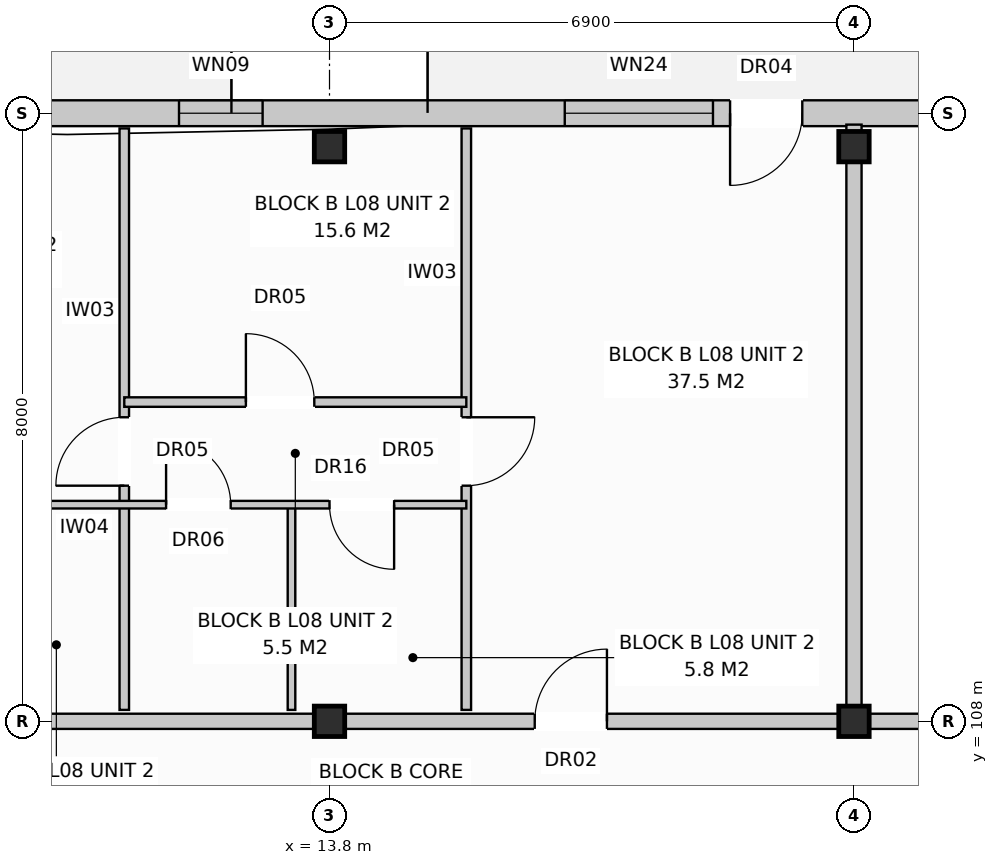
"""IFC4 building model, lengths in metres.
Left out: names, types, materials, properties, quantities, classifications, styles, units other than length and angle.
Written with IfcOpenShell. Run it as: python <this file> out.ifc"""

import sys

from ifc_helpers import new_model, si_unit, direction, frame, frame_2d, origin, origin_with_axes, origin_2d, place, context, subcontext, project, spatial, rectangle, extrude, element, fill, save


model = new_model("IFC4")
c1 = context("Model", 3, precision=1e-05, world=origin(), true_north=direction((0.0, 1.0)))
c2 = subcontext(c1, "Body", "Model", "MODEL_VIEW")
j1 = project(units=[si_unit("LENGTHUNIT", "METRE"), si_unit("PLANEANGLEUNIT", "RADIAN")], contexts=[c1])
p1 = place(None, origin())
s1 = spatial("IfcSite", under=j1, at=p1, CompositionType="ELEMENT")
p2 = place(p1, origin())
s2 = spatial("IfcBuilding", under=s1, at=p2, CompositionType="ELEMENT")
p3 = place(p2, frame((0.0, 0.0, 27.2)))
s3 = spatial("IfcBuildingStorey", under=s2, at=p3, CompositionType="ELEMENT", Elevation=27.2)
for number, where, z_axis, x_axis in (
    (1, (13.8, 108.0, 0.0), (0.0, 0.0, 1.0), (1.0, 0.0, 0.0)),
    (2, (13.8, 115.56, 0.0), (0.0, 0.0, 1.0), (1.0, 0.0, 0.0)),
    (3, (20.7, 108.0, 0.0), (0.0, 0.0, 1.0), (1.0, 0.0, 0.0)),
    (4, (20.7, 115.56, 0.0), (0.0, 0.0, 1.0), (1.0, 0.0, 0.0)),
):
    element("IfcColumn", number, at=place(p3, frame(where, z_axis=z_axis, x_axis=x_axis)), inside=s3, PredefinedType="COLUMN", context=c2, shape_type="SweptSolid", body=[
        extrude(rectangle(XDim=0.4, YDim=0.4, at=origin_2d()), origin(), (0.0, 0.0, 1.0), 3.2),
    ])
p4 = place(p3, frame((0.16, 116.0, 0.0), z_axis=(0.0, 0.0, 1.0), x_axis=(1.0, 0.0, 0.0)))
e5 = element("IfcWall", 5, at=p4, inside=s3, PredefinedType="STANDARD", context=c2, shape_type="SweptSolid", body=[
    extrude(rectangle(XDim=41.08, YDim=0.34, at=frame_2d((20.54, 0.0))), origin(), (0.0, 0.0, 1.0), 2.96),
])
p5 = place(p4, frame((2.5, 0.0, 0.0)))
e6 = element("IfcOpeningElement", 6, at=p5, cuts=e5, PredefinedType="OPENING", context=c2, shape_type="SweptSolid", body=[
    extrude(rectangle(XDim=0.95, YDim=2.1, at=frame_2d((0.475, 1.05))), frame((0.0, 0.182, 0.0), z_axis=(0.0, -1.0, 0.0), x_axis=(1.0, 0.0, 0.0)), (0.0, 0.0, 1.0), 0.364),
])
p6 = place(p4, frame((18.91, 0.0, 0.0)))
e7 = element("IfcOpeningElement", 7, at=p6, cuts=e5, PredefinedType="OPENING", context=c2, shape_type="SweptSolid", body=[
    extrude(rectangle(XDim=0.95, YDim=2.1, at=frame_2d((0.475, 1.05))), frame((0.0, 0.182, 0.0), z_axis=(0.0, -1.0, 0.0), x_axis=(1.0, 0.0, 0.0)), (0.0, 0.0, 1.0), 0.364),
])
p7 = place(p4, frame((32.71, 0.0, 0.0)))
e8 = element("IfcOpeningElement", 8, at=p7, cuts=e5, PredefinedType="OPENING", context=c2, shape_type="SweptSolid", body=[
    extrude(rectangle(XDim=0.95, YDim=2.1, at=frame_2d((0.475, 1.05))), frame((0.0, 0.182, 0.0), z_axis=(0.0, -1.0, 0.0), x_axis=(1.0, 0.0, 0.0)), (0.0, 0.0, 1.0), 0.364),
])
p8 = place(p4, frame((0.81, 0.0, 0.72)))
e9 = element("IfcOpeningElement", 9, at=p8, cuts=e5, PredefinedType="OPENING", context=c2, shape_type="SweptSolid", body=[
    extrude(rectangle(XDim=1.1, YDim=1.5, at=frame_2d((0.55, 0.75))), frame((0.0, 0.182, 0.0), z_axis=(0.0, -1.0, 0.0), x_axis=(1.0, 0.0, 0.0)), (0.0, 0.0, 1.0), 0.364),
])
p9 = place(p4, frame((4.235, 0.0, 0.8)))
e10 = element("IfcOpeningElement", 10, at=p9, cuts=e5, PredefinedType="OPENING", context=c2, shape_type="SweptSolid", body=[
    extrude(rectangle(XDim=1.95, YDim=1.65, at=frame_2d((0.975, 0.825))), frame((0.0, 0.182, 0.0), z_axis=(0.0, -1.0, 0.0), x_axis=(1.0, 0.0, 0.0)), (0.0, 0.0, 1.0), 0.364),
])
p10 = place(p4, frame((8.01, 0.0, 0.8)))
e11 = element("IfcOpeningElement", 11, at=p10, cuts=e5, PredefinedType="OPENING", context=c2, shape_type="SweptSolid", body=[
    extrude(rectangle(XDim=1.8, YDim=1.7, at=frame_2d((0.9, 0.85))), frame((0.0, 0.182, 0.0), z_axis=(0.0, -1.0, 0.0), x_axis=(1.0, 0.0, 0.0)), (0.0, 0.0, 1.0), 0.364),
])
p11 = place(p4, frame((11.66, 0.0, 0.72)))
e12 = element("IfcOpeningElement", 12, at=p11, cuts=e5, PredefinedType="OPENING", context=c2, shape_type="SweptSolid", body=[
    extrude(rectangle(XDim=1.1, YDim=1.5, at=frame_2d((0.55, 0.75))), frame((0.0, 0.182, 0.0), z_axis=(0.0, -1.0, 0.0), x_axis=(1.0, 0.0, 0.0)), (0.0, 0.0, 1.0), 0.364),
])
p12 = place(p4, frame((16.735, 0.0, 0.8)))
e13 = element("IfcOpeningElement", 13, at=p12, cuts=e5, PredefinedType="OPENING", context=c2, shape_type="SweptSolid", body=[
    extrude(rectangle(XDim=1.95, YDim=1.65, at=frame_2d((0.975, 0.825))), frame((0.0, 0.182, 0.0), z_axis=(0.0, -1.0, 0.0), x_axis=(1.0, 0.0, 0.0)), (0.0, 0.0, 1.0), 0.364),
])
p13 = place(p4, frame((22.31, 0.0, 0.8)))
e14 = element("IfcOpeningElement", 14, at=p13, cuts=e5, PredefinedType="OPENING", context=c2, shape_type="SweptSolid", body=[
    extrude(rectangle(XDim=1.8, YDim=1.7, at=frame_2d((0.9, 0.85))), frame((0.0, 0.182, 0.0), z_axis=(0.0, -1.0, 0.0), x_axis=(1.0, 0.0, 0.0)), (0.0, 0.0, 1.0), 0.364),
])
p14 = place(p4, frame((28.36, 0.0, 0.72)))
e15 = element("IfcOpeningElement", 15, at=p14, cuts=e5, PredefinedType="OPENING", context=c2, shape_type="SweptSolid", body=[
    extrude(rectangle(XDim=1.1, YDim=1.5, at=frame_2d((0.55, 0.75))), frame((0.0, 0.182, 0.0), z_axis=(0.0, -1.0, 0.0), x_axis=(1.0, 0.0, 0.0)), (0.0, 0.0, 1.0), 0.364),
])
p15 = place(p4, frame((30.435, 0.0, 0.8)))
e16 = element("IfcOpeningElement", 16, at=p15, cuts=e5, PredefinedType="OPENING", context=c2, shape_type="SweptSolid", body=[
    extrude(rectangle(XDim=1.95, YDim=1.65, at=frame_2d((0.975, 0.825))), frame((0.0, 0.182, 0.0), z_axis=(0.0, -1.0, 0.0), x_axis=(1.0, 0.0, 0.0)), (0.0, 0.0, 1.0), 0.364),
])
p16 = place(p4, frame((35.61, 0.0, 0.8)))
e17 = element("IfcOpeningElement", 17, at=p16, cuts=e5, PredefinedType="OPENING", context=c2, shape_type="SweptSolid", body=[
    extrude(rectangle(XDim=1.8, YDim=1.7, at=frame_2d((0.9, 0.85))), frame((0.0, 0.182, 0.0), z_axis=(0.0, -1.0, 0.0), x_axis=(1.0, 0.0, 0.0)), (0.0, 0.0, 1.0), 0.364),
])
p17 = place(p4, frame((39.26, 0.0, 0.72)))
e18 = element("IfcOpeningElement", 18, at=p17, cuts=e5, PredefinedType="OPENING", context=c2, shape_type="SweptSolid", body=[
    extrude(rectangle(XDim=1.1, YDim=1.5, at=frame_2d((0.55, 0.75))), frame((0.0, 0.182, 0.0), z_axis=(0.0, -1.0, 0.0), x_axis=(1.0, 0.0, 0.0)), (0.0, 0.0, 1.0), 0.364),
])
p18 = place(p3, frame((20.7, 108.15, 0.0), z_axis=(0.0, 0.0, 1.0), x_axis=(0.0, 1.0, 0.0)))
e19 = element("IfcWall", 19, at=p18, inside=s3, PredefinedType="PARTITIONING", context=c2, shape_type="SweptSolid", body=[
    extrude(rectangle(XDim=7.7, YDim=0.2, at=frame_2d((3.85, 0.0))), origin(), (0.0, 0.0, 1.0), 2.96),
])
p19 = place(p3, frame((6.9, 108.0, 0.0), z_axis=(0.0, 0.0, 1.0), x_axis=(1.0, 0.0, 0.0)))
e20 = element("IfcWall", 20, at=p19, inside=s3, PredefinedType="PARTITIONING", context=c2, shape_type="SweptSolid", body=[
    extrude(rectangle(XDim=13.8, YDim=0.2, at=frame_2d((6.9, 0.0))), origin(), (0.0, 0.0, 1.0), 2.4),
])
p20 = place(p19, frame((9.6, 0.0, 0.0)))
e21 = element("IfcOpeningElement", 21, at=p20, cuts=e20, PredefinedType="OPENING", context=c2, shape_type="SweptSolid", body=[
    extrude(rectangle(XDim=0.95, YDim=2.15, at=frame_2d((0.475, 1.075))), frame((0.0, 0.112, 0.0), z_axis=(0.0, -1.0, 0.0), x_axis=(1.0, 0.0, 0.0)), (0.0, 0.0, 1.0), 0.224),
])
p21 = place(p3, frame((15.6, 108.15, 0.0), z_axis=(0.0, 0.0, 1.0), x_axis=(0.0, 1.0, 0.0)))
e22 = element("IfcWall", 22, at=p21, inside=s3, PredefinedType="PARTITIONING", context=c2, shape_type="SweptSolid", body=[
    extrude(rectangle(XDim=7.65, YDim=0.125, at=frame_2d((3.825, 0.0))), origin(), (0.0, 0.0, 1.0), 2.59),
])
p22 = place(p21, frame((2.95, 0.0, 0.0)))
e23 = element("IfcOpeningElement", 23, at=p22, cuts=e22, PredefinedType="OPENING", context=c2, shape_type="SweptSolid", body=[
    extrude(rectangle(XDim=0.9, YDim=2.1, at=frame_2d((0.45, 1.05))), frame((0.0, 0.074, 0.0), z_axis=(0.0, -1.0, 0.0), x_axis=(1.0, 0.0, 0.0)), (0.0, 0.0, 1.0), 0.149),
])
p23 = place(p3, frame((11.1, 108.15, 0.0), z_axis=(0.0, 0.0, 1.0), x_axis=(0.0, 1.0, 0.0)))
e24 = element("IfcWall", 24, at=p23, inside=s3, PredefinedType="PARTITIONING", context=c2, shape_type="SweptSolid", body=[
    extrude(rectangle(XDim=7.65, YDim=0.125, at=frame_2d((3.825, 0.0))), origin(), (0.0, 0.0, 1.0), 2.96),
])
p24 = place(p23, frame((2.95, 0.0, 0.0)))
e25 = element("IfcOpeningElement", 25, at=p24, cuts=e24, PredefinedType="OPENING", context=c2, shape_type="SweptSolid", body=[
    extrude(rectangle(XDim=0.9, YDim=2.1, at=frame_2d((0.45, 1.05))), frame((0.0, 0.074, 0.0), z_axis=(0.0, -1.0, 0.0), x_axis=(1.0, 0.0, 0.0)), (0.0, 0.0, 1.0), 0.149),
])
p25 = place(p3, frame((13.3, 108.15, 0.0), z_axis=(0.0, 0.0, 1.0), x_axis=(0.0, 1.0, 0.0)))
e26 = element("IfcWall", 26, at=p25, inside=s3, PredefinedType="PARTITIONING", context=c2, shape_type="SweptSolid", body=[
    extrude(rectangle(XDim=2.7, YDim=0.1, at=frame_2d((1.35, 0.0))), origin(), (0.0, 0.0, 1.0), 2.96),
])
p26 = place(p3, frame((7.0, 110.85, 0.0), z_axis=(0.0, 0.0, 1.0), x_axis=(1.0, 0.0, 0.0)))
e27 = element("IfcWall", 27, at=p26, inside=s3, PredefinedType="PARTITIONING", context=c2, shape_type="SweptSolid", body=[
    extrude(rectangle(XDim=8.6, YDim=0.1, at=frame_2d((4.3, 0.0))), origin(), (0.0, 0.0, 1.0), 2.96),
])
p27 = place(p26, frame((1.4, 0.0, 0.0)))
e28 = element("IfcOpeningElement", 28, at=p27, cuts=e27, PredefinedType="OPENING", context=c2, shape_type="SweptSolid", body=[
    extrude(rectangle(XDim=0.85, YDim=2.05, at=frame_2d((0.425, 1.025))), frame((0.0, 0.062, 0.0), z_axis=(0.0, -1.0, 0.0), x_axis=(1.0, 0.0, 0.0)), (0.0, 0.0, 1.0), 0.124),
])
p28 = place(p26, frame((4.65, 0.0, 0.0)))
e29 = element("IfcOpeningElement", 29, at=p28, cuts=e27, PredefinedType="OPENING", context=c2, shape_type="SweptSolid", body=[
    extrude(rectangle(XDim=0.85, YDim=2.05, at=frame_2d((0.425, 1.025))), frame((0.0, 0.062, 0.0), z_axis=(0.0, -1.0, 0.0), x_axis=(1.0, 0.0, 0.0)), (0.0, 0.0, 1.0), 0.124),
])
p29 = place(p26, frame((6.8, 0.0, 0.0)))
e30 = element("IfcOpeningElement", 30, at=p29, cuts=e27, PredefinedType="OPENING", context=c2, shape_type="SweptSolid", body=[
    extrude(rectangle(XDim=0.85, YDim=2.1, at=frame_2d((0.425, 1.05))), frame((0.0, 0.062, 0.0), z_axis=(0.0, -1.0, 0.0), x_axis=(1.0, 0.0, 0.0)), (0.0, 0.0, 1.0), 0.124),
])
p30 = place(p3, frame((11.1, 112.2, 0.0), z_axis=(0.0, 0.0, 1.0), x_axis=(1.0, 0.0, 0.0)))
e31 = element("IfcWall", 31, at=p30, inside=s3, PredefinedType="PARTITIONING", context=c2, shape_type="SweptSolid", body=[
    extrude(rectangle(XDim=4.5, YDim=0.125, at=frame_2d((2.25, 0.0))), origin(), (0.0, 0.0, 1.0), 2.96),
])
p31 = place(p30, frame((1.6, 0.0, 0.0)))
e32 = element("IfcOpeningElement", 32, at=p31, cuts=e31, PredefinedType="OPENING", context=c2, shape_type="SweptSolid", body=[
    extrude(rectangle(XDim=0.9, YDim=2.1, at=frame_2d((0.45, 1.05))), frame((0.0, 0.074, 0.0), z_axis=(0.0, -1.0, 0.0), x_axis=(1.0, 0.0, 0.0)), (0.0, 0.0, 1.0), 0.149),
])
p32 = place(p3, frame((20.7, 108.0, 0.0), z_axis=(0.0, 0.0, 1.0), x_axis=(1.0, 0.0, 0.0)))
e33 = element("IfcWall", 33, at=p32, inside=s3, PredefinedType="PARTITIONING", context=c2, shape_type="SweptSolid", body=[
    extrude(rectangle(XDim=13.8, YDim=0.2, at=frame_2d((6.9, 0.0))), origin(), (0.0, 0.0, 1.0), 2.4),
])
p33 = place(p32, frame((2.4, 0.0, 0.0)))
e34 = element("IfcOpeningElement", 34, at=p33, cuts=e33, PredefinedType="OPENING", context=c2, shape_type="SweptSolid", body=[
    extrude(rectangle(XDim=0.95, YDim=2.15, at=frame_2d((0.475, 1.075))), frame((0.0, 0.112, 0.0), z_axis=(0.0, -1.0, 0.0), x_axis=(1.0, 0.0, 0.0)), (0.0, 0.0, 1.0), 0.224),
])
p34 = place(p6, frame((0.95, 0.0, 0.0), z_axis=(0.0, 0.0, 1.0), x_axis=(-1.0, 0.0, 0.0)))
e35 = element("IfcDoor", 35, at=p34, inside=s3, OperationType="SINGLE_SWING_LEFT", PredefinedType="DOOR", context=c2, shape_type="SweptSolid", body=[
    extrude(rectangle(XDim=0.95, YDim=2.1, at=frame_2d((0.475, 1.05))), frame((0.0, 0.025, 0.0), z_axis=(0.0, -1.0, 0.0), x_axis=(1.0, 0.0, 0.0)), (0.0, 0.0, 1.0), 0.05),
])
fill(e7, e35)
p35 = place(p11, origin_with_axes())
e36 = element("IfcWindow", 36, at=p35, inside=s3, PartitioningType="SINGLE_PANEL", PredefinedType="WINDOW", context=c2, shape_type="SweptSolid", body=[
    extrude(rectangle(XDim=1.1, YDim=1.5, at=frame_2d((0.55, 0.75))), frame((0.0, 0.03, 0.0), z_axis=(0.0, -1.0, 0.0), x_axis=(1.0, 0.0, 0.0)), (0.0, 0.0, 1.0), 0.06),
])
fill(e12, e36)
p36 = place(p12, origin_with_axes())
e37 = element("IfcWindow", 37, at=p36, inside=s3, PartitioningType="SINGLE_PANEL", PredefinedType="WINDOW", context=c2, shape_type="SweptSolid", body=[
    extrude(rectangle(XDim=1.95, YDim=1.65, at=frame_2d((0.975, 0.825))), frame((0.0, 0.03, 0.0), z_axis=(0.0, -1.0, 0.0), x_axis=(1.0, 0.0, 0.0)), (0.0, 0.0, 1.0), 0.06),
])
fill(e13, e37)
p37 = place(p20, origin_with_axes())
e38 = element("IfcDoor", 38, at=p37, inside=s3, OperationType="SINGLE_SWING_RIGHT", PredefinedType="DOOR", context=c2, shape_type="SweptSolid", body=[
    extrude(rectangle(XDim=0.95, YDim=2.15, at=frame_2d((0.475, 1.075))), frame((0.0, 0.025, 0.0), z_axis=(0.0, -1.0, 0.0), x_axis=(1.0, 0.0, 0.0)), (0.0, 0.0, 1.0), 0.05),
])
fill(e21, e38)
p38 = place(p22, frame((0.9, 0.0, 0.0), z_axis=(0.0, 0.0, 1.0), x_axis=(-1.0, 0.0, 0.0)))
e39 = element("IfcDoor", 39, at=p38, inside=s3, OperationType="SINGLE_SWING_RIGHT", PredefinedType="DOOR", context=c2, shape_type="SweptSolid", body=[
    extrude(rectangle(XDim=0.9, YDim=2.1, at=frame_2d((0.45, 1.05))), frame((0.0, 0.025, 0.0), z_axis=(0.0, -1.0, 0.0), x_axis=(1.0, 0.0, 0.0)), (0.0, 0.0, 1.0), 0.05),
])
fill(e23, e39)
p39 = place(p24, origin_with_axes())
e40 = element("IfcDoor", 40, at=p39, inside=s3, OperationType="SINGLE_SWING_LEFT", PredefinedType="DOOR", context=c2, shape_type="SweptSolid", body=[
    extrude(rectangle(XDim=0.9, YDim=2.1, at=frame_2d((0.45, 1.05))), frame((0.0, 0.025, 0.0), z_axis=(0.0, -1.0, 0.0), x_axis=(1.0, 0.0, 0.0)), (0.0, 0.0, 1.0), 0.05),
])
fill(e25, e40)
p40 = place(p28, origin_with_axes())
e41 = element("IfcDoor", 41, at=p40, inside=s3, OperationType="SINGLE_SWING_LEFT", PredefinedType="DOOR", context=c2, shape_type="SweptSolid", body=[
    extrude(rectangle(XDim=0.85, YDim=2.05, at=frame_2d((0.425, 1.025))), frame((0.0, 0.025, 0.0), z_axis=(0.0, -1.0, 0.0), x_axis=(1.0, 0.0, 0.0)), (0.0, 0.0, 1.0), 0.05),
])
fill(e29, e41)
p41 = place(p29, frame((0.85, 0.0, 0.0), z_axis=(0.0, 0.0, 1.0), x_axis=(-1.0, 0.0, 0.0)))
e42 = element("IfcDoor", 42, at=p41, inside=s3, OperationType="SINGLE_SWING_RIGHT", PredefinedType="DOOR", context=c2, shape_type="SweptSolid", body=[
    extrude(rectangle(XDim=0.85, YDim=2.1, at=frame_2d((0.425, 1.05))), frame((0.0, 0.025, 0.0), z_axis=(0.0, -1.0, 0.0), x_axis=(1.0, 0.0, 0.0)), (0.0, 0.0, 1.0), 0.05),
])
fill(e30, e42)
p42 = place(p31, origin_with_axes())
e43 = element("IfcDoor", 43, at=p42, inside=s3, OperationType="SINGLE_SWING_LEFT", PredefinedType="DOOR", context=c2, shape_type="SweptSolid", body=[
    extrude(rectangle(XDim=0.9, YDim=2.1, at=frame_2d((0.45, 1.05))), frame((0.0, 0.025, 0.0), z_axis=(0.0, -1.0, 0.0), x_axis=(1.0, 0.0, 0.0)), (0.0, 0.0, 1.0), 0.05),
])
fill(e32, e43)
save(model, sys.argv[1])
